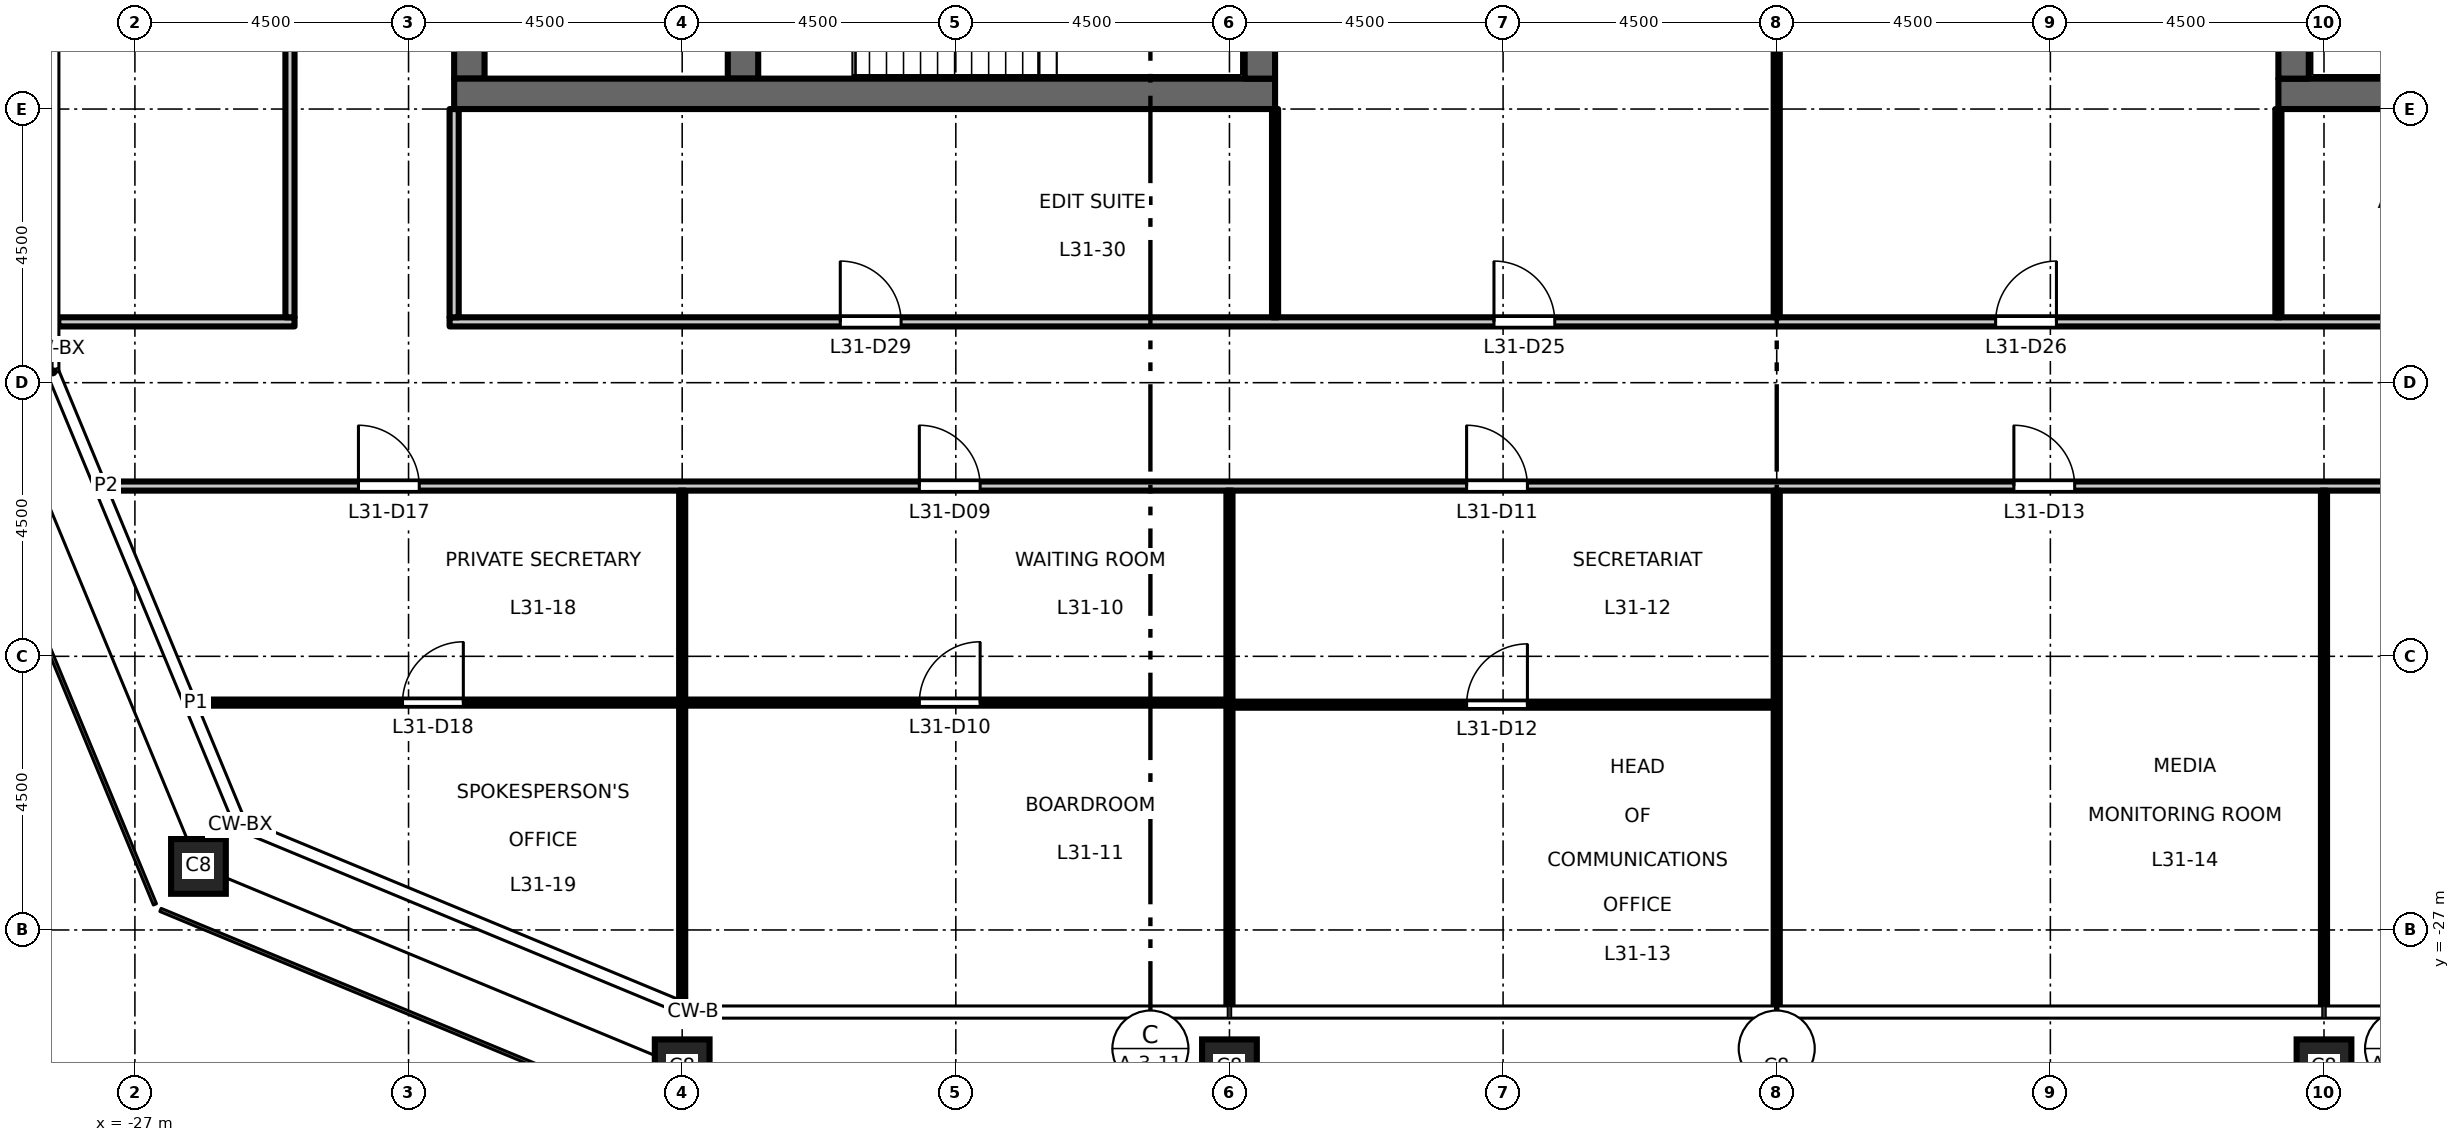
"""IFC4 building model, lengths in metres.
Left out: names, types, materials, properties, quantities, classifications, styles, units other than length and angle.
Written with IfcOpenShell. Run it as: python <this file> out.ifc"""

import sys

from ifc_helpers import new_model, si_unit, direction, frame, frame_2d, origin, origin_2d, place, context, subcontext, project, spatial, rectangle, hollow_rectangle, extrude, element, fill, save


model = new_model("IFC4")
c1 = context("Model", 3, precision=1e-05, world=origin(), true_north=direction((0.0, 1.0)))
c2 = subcontext(c1, "Body", "Model", "MODEL_VIEW")
j1 = project(units=[si_unit("LENGTHUNIT", "METRE"), si_unit("PLANEANGLEUNIT", "RADIAN")], contexts=[c1])
p1 = place(None, origin())
s1 = spatial("IfcSite", under=j1, at=p1, CompositionType="ELEMENT")
p2 = place(p1, origin())
s2 = spatial("IfcBuilding", under=s1, at=p2, CompositionType="ELEMENT")
p3 = place(p2, frame((0.0, 0.0, 145.2)))
s3 = spatial("IfcBuildingStorey", under=s2, at=p3, CompositionType="ELEMENT", Elevation=145.2)
for number, where, z_axis, x_axis in (
    (1, (-18.0, -29.25, 0.0), (0.0, 0.0, 1.0), (1.0, 0.0, 0.0)),
    (2, (-9.0, -29.25, 0.0), (0.0, 0.0, 1.0), (1.0, 0.0, 0.0)),
    (3, (0.0, -29.25, 0.0), (0.0, 0.0, 1.0), (1.0, 0.0, 0.0)),
    (4, (9.0, -29.25, 0.0), (0.0, 0.0, 1.0), (1.0, 0.0, 0.0)),
    (5, (-25.955, -25.955, 0.0), (0.0, 0.0, 1.0), (1.0, 0.0, 0.0)),
):
    element("IfcColumn", number, at=place(p3, frame(where, z_axis=z_axis, x_axis=x_axis)), inside=s3, PredefinedType="COLUMN", context=c2, shape_type="SweptSolid", body=[
        extrude(hollow_rectangle(XDim=0.9, YDim=0.9, WallThickness=0.05, at=origin_2d()), origin(), (0.0, 0.0, 1.0), 4.5),
    ])
p4 = place(p3, frame((-21.5, -13.0, 0.0), z_axis=(0.0, 0.0, 1.0), x_axis=(0.0, 1.0, 0.0)))
e6 = element("IfcWall", 6, at=p4, inside=s3, PredefinedType="SHEAR", context=c2, shape_type="SweptSolid", body=[
    extrude(rectangle(XDim=26.0, YDim=0.5, at=frame_2d((13.0, 0.0))), origin(), (0.0, 0.0, 1.0), 4.35),
])
p5 = place(p4, frame((16.825, 0.0, 0.0)))
e7 = element("IfcOpeningElement", 7, at=p5, cuts=e6, PredefinedType="OPENING", context=c2, shape_type="SweptSolid", body=[
    extrude(rectangle(XDim=1.8, YDim=2.1, at=frame_2d((0.9, 1.05))), frame((0.0, 0.26, 0.0), z_axis=(0.0, -1.0, 0.0), x_axis=(1.0, 0.0, 0.0)), (0.0, 0.0, 1.0), 0.52),
])
p6 = place(p4, frame((7.375, 0.0, 0.0)))
e8 = element("IfcOpeningElement", 8, at=p6, cuts=e6, PredefinedType="OPENING", context=c2, shape_type="SweptSolid", body=[
    extrude(rectangle(XDim=1.8, YDim=2.1, at=frame_2d((0.9, 1.05))), frame((0.0, 0.26, 0.0), z_axis=(0.0, -1.0, 0.0), x_axis=(1.0, 0.0, 0.0)), (0.0, 0.0, 1.0), 0.52),
])
p7 = place(p4, frame((23.4, 0.0, 0.0)))
e9 = element("IfcOpeningElement", 9, at=p7, cuts=e6, PredefinedType="OPENING", context=c2, shape_type="SweptSolid", body=[
    extrude(rectangle(XDim=0.9, YDim=2.1, at=frame_2d((0.45, 1.05))), frame((0.0, 0.26, 0.0), z_axis=(0.0, -1.0, 0.0), x_axis=(1.0, 0.0, 0.0)), (0.0, 0.0, 1.0), 0.52),
])
p8 = place(p3, frame((-17.0, -13.0, 0.0), z_axis=(0.0, 0.0, 1.0), x_axis=(0.0, 1.0, 0.0)))
e10 = element("IfcWall", 10, at=p8, inside=s3, PredefinedType="SHEAR", context=c2, shape_type="SweptSolid", body=[
    extrude(rectangle(XDim=6.575, YDim=0.5, at=frame_2d((3.288, 0.0))), origin(), (0.0, 0.0, 1.0), 4.35),
])
p9 = place(p3, frame((-8.25, -13.25, 0.0), z_axis=(0.0, 0.0, 1.0), x_axis=(-1.0, 0.0, 0.0)))
e11 = element("IfcWall", 11, at=p9, inside=s3, PredefinedType="SHEAR", context=c2, shape_type="SweptSolid", body=[
    extrude(rectangle(XDim=13.5, YDim=0.5, at=frame_2d((6.75, 0.0))), origin(), (0.0, 0.0, 1.0), 4.35),
])
p10 = place(p3, frame((-8.5, -13.0, 0.0), z_axis=(0.0, 0.0, 1.0), x_axis=(0.0, 1.0, 0.0)))
e12 = element("IfcWall", 12, at=p10, inside=s3, PredefinedType="SHEAR", context=c2, shape_type="SweptSolid", body=[
    extrude(rectangle(XDim=26.0, YDim=0.5, at=frame_2d((13.0, 0.0))), origin(), (0.0, 0.0, 1.0), 4.35),
])
p11 = place(p3, frame((8.25, -13.25, 0.0), z_axis=(0.0, 0.0, 1.0), x_axis=(1.0, 0.0, 0.0)))
e13 = element("IfcWall", 13, at=p11, inside=s3, PredefinedType="SHEAR", context=c2, shape_type="SweptSolid", body=[
    extrude(rectangle(XDim=13.5, YDim=0.5, at=frame_2d((6.75, 0.0))), origin(), (0.0, 0.0, 1.0), 4.35),
])
p12 = place(p3, frame((8.5, -13.0, 0.0), z_axis=(0.0, 0.0, 1.0), x_axis=(0.0, 1.0, 0.0)))
e14 = element("IfcWall", 14, at=p12, inside=s3, PredefinedType="SHEAR", context=c2, shape_type="SweptSolid", body=[
    extrude(rectangle(XDim=26.0, YDim=0.5, at=frame_2d((13.0, 0.0))), origin(), (0.0, 0.0, 1.0), 4.35),
])
p13 = place(p3, frame((-8.95, -23.295, 0.0), z_axis=(0.0, 0.0, 1.0), x_axis=(1.0, 0.0, 0.0)))
e15 = element("IfcWall", 15, at=p13, inside=s3, PredefinedType="PARTITIONING", context=c2, shape_type="SweptSolid", body=[
    extrude(rectangle(XDim=8.9, YDim=0.1, at=frame_2d((4.45, 0.0))), origin(), (0.0, 0.0, 1.0), 4.35),
])
p14 = place(p13, frame((3.85, 0.0, 0.0)))
e16 = element("IfcOpeningElement", 16, at=p14, cuts=e15, PredefinedType="OPENING", context=c2, shape_type="SweptSolid", body=[
    extrude(rectangle(XDim=1.0, YDim=2.1, at=frame_2d((0.5, 1.05))), frame((0.0, 0.06, 0.0), z_axis=(0.0, -1.0, 0.0), x_axis=(1.0, 0.0, 0.0)), (0.0, 0.0, 1.0), 0.12),
])
p15 = place(p3, frame((-25.999, -23.261, 0.0), z_axis=(0.0, 0.0, 1.0), x_axis=(1.0, 0.0, 0.0)))
e17 = element("IfcWall", 17, at=p15, inside=s3, PredefinedType="PARTITIONING", context=c2, shape_type="SweptSolid", body=[
    extrude(rectangle(XDim=16.949, YDim=0.1, at=frame_2d((8.475, 0.0))), origin(), (0.0, 0.0, 1.0), 4.35),
])
p16 = place(p15, frame((11.899, 0.0, 0.0)))
e18 = element("IfcOpeningElement", 18, at=p16, cuts=e17, PredefinedType="OPENING", context=c2, shape_type="SweptSolid", body=[
    extrude(rectangle(XDim=1.0, YDim=2.1, at=frame_2d((0.5, 1.05))), frame((0.0, 0.06, 0.0), z_axis=(0.0, -1.0, 0.0), x_axis=(1.0, 0.0, 0.0)), (0.0, 0.0, 1.0), 0.12),
])
p17 = place(p15, frame((3.4, 0.0, 0.0)))
e19 = element("IfcOpeningElement", 19, at=p17, cuts=e17, PredefinedType="OPENING", context=c2, shape_type="SweptSolid", body=[
    extrude(rectangle(XDim=1.0, YDim=2.1, at=frame_2d((0.5, 1.05))), frame((0.0, 0.06, 0.0), z_axis=(0.0, -1.0, 0.0), x_axis=(1.0, 0.0, 0.0)), (0.0, 0.0, 1.0), 0.12),
])
p18 = place(p3, frame((-27.474, -19.7, 0.0), z_axis=(0.0, 0.0, 1.0), x_axis=(1.0, 0.0, 0.0)))
e20 = element("IfcWall", 20, at=p18, inside=s3, PredefinedType="PARTITIONING", context=c2, shape_type="SweptSolid", body=[
    extrude(rectangle(XDim=54.948, YDim=0.15, at=frame_2d((27.474, 0.0))), origin(), (0.0, 0.0, 1.0), 4.35),
])
p19 = place(p18, frame((13.374, 0.0, 0.0)))
e21 = element("IfcOpeningElement", 21, at=p19, cuts=e20, PredefinedType="OPENING", context=c2, shape_type="SweptSolid", body=[
    extrude(rectangle(XDim=1.0, YDim=2.1, at=frame_2d((0.5, 1.05))), frame((0.0, 0.085, 0.0), z_axis=(0.0, -1.0, 0.0), x_axis=(1.0, 0.0, 0.0)), (0.0, 0.0, 1.0), 0.17),
])
p20 = place(p18, frame((22.374, 0.0, 0.0)))
e22 = element("IfcOpeningElement", 22, at=p20, cuts=e20, PredefinedType="OPENING", context=c2, shape_type="SweptSolid", body=[
    extrude(rectangle(XDim=1.0, YDim=2.1, at=frame_2d((0.5, 1.05))), frame((0.0, 0.085, 0.0), z_axis=(0.0, -1.0, 0.0), x_axis=(1.0, 0.0, 0.0)), (0.0, 0.0, 1.0), 0.17),
])
p21 = place(p18, frame((31.374, 0.0, 0.0)))
e23 = element("IfcOpeningElement", 23, at=p21, cuts=e20, PredefinedType="OPENING", context=c2, shape_type="SweptSolid", body=[
    extrude(rectangle(XDim=1.0, YDim=2.1, at=frame_2d((0.5, 1.05))), frame((0.0, 0.085, 0.0), z_axis=(0.0, -1.0, 0.0), x_axis=(1.0, 0.0, 0.0)), (0.0, 0.0, 1.0), 0.17),
])
p22 = place(p18, frame((40.374, 0.0, 0.0)))
e24 = element("IfcOpeningElement", 24, at=p22, cuts=e20, PredefinedType="OPENING", context=c2, shape_type="SweptSolid", body=[
    extrude(rectangle(XDim=1.0, YDim=2.1, at=frame_2d((0.5, 1.05))), frame((0.0, 0.085, 0.0), z_axis=(0.0, -1.0, 0.0), x_axis=(1.0, 0.0, 0.0)), (0.0, 0.0, 1.0), 0.17),
])
p23 = place(p18, frame((4.15, 0.0, 0.0)))
e25 = element("IfcOpeningElement", 25, at=p23, cuts=e20, PredefinedType="OPENING", context=c2, shape_type="SweptSolid", body=[
    extrude(rectangle(XDim=1.0, YDim=2.1, at=frame_2d((0.5, 1.05))), frame((0.0, 0.085, 0.0), z_axis=(0.0, -1.0, 0.0), x_axis=(1.0, 0.0, 0.0)), (0.0, 0.0, 1.0), 0.17),
])
p24 = place(p18, frame((49.624, 0.0, 0.0)))
e26 = element("IfcOpeningElement", 26, at=p24, cuts=e20, PredefinedType="OPENING", context=c2, shape_type="SweptSolid", body=[
    extrude(rectangle(XDim=1.0, YDim=2.1, at=frame_2d((0.5, 1.05))), frame((0.0, 0.085, 0.0), z_axis=(0.0, -1.0, 0.0), x_axis=(1.0, 0.0, 0.0)), (0.0, 0.0, 1.0), 0.17),
])
p25 = place(p3, frame((-28.26, -17.0, 0.0), z_axis=(0.0, 0.0, 1.0), x_axis=(1.0, 0.0, 0.0)))
e27 = element("IfcWall", 27, at=p25, inside=s3, PredefinedType="PARTITIONING", context=c2, shape_type="SweptSolid", body=[
    extrude(rectangle(XDim=3.885, YDim=0.15, at=frame_2d((1.942, 0.0))), origin(), (0.0, 0.0, 1.0), 4.35),
])
p26 = place(p3, frame((-21.825, -17.0, 0.0), z_axis=(0.0, 0.0, 1.0), x_axis=(1.0, 0.0, 0.0)))
e28 = element("IfcWall", 28, at=p26, inside=s3, PredefinedType="PARTITIONING", context=c2, shape_type="SweptSolid", body=[
    extrude(rectangle(XDim=43.65, YDim=0.15, at=frame_2d((21.825, 0.0))), origin(), (0.0, 0.0, 1.0), 4.35),
])
p27 = place(p26, frame((17.175, 0.0, 0.0)))
e29 = element("IfcOpeningElement", 29, at=p27, cuts=e28, PredefinedType="OPENING", context=c2, shape_type="SweptSolid", body=[
    extrude(rectangle(XDim=1.0, YDim=2.1, at=frame_2d((0.5, 1.05))), frame((0.0, 0.085, 0.0), z_axis=(0.0, -1.0, 0.0), x_axis=(1.0, 0.0, 0.0)), (0.0, 0.0, 1.0), 0.17),
])
p28 = place(p26, frame((25.425, 0.0, 0.0)))
e30 = element("IfcOpeningElement", 30, at=p28, cuts=e28, PredefinedType="OPENING", context=c2, shape_type="SweptSolid", body=[
    extrude(rectangle(XDim=1.0, YDim=2.1, at=frame_2d((0.5, 1.05))), frame((0.0, 0.085, 0.0), z_axis=(0.0, -1.0, 0.0), x_axis=(1.0, 0.0, 0.0)), (0.0, 0.0, 1.0), 0.17),
])
p29 = place(p26, frame((6.425, 0.0, 0.0)))
e31 = element("IfcOpeningElement", 31, at=p29, cuts=e28, PredefinedType="OPENING", context=c2, shape_type="SweptSolid", body=[
    extrude(rectangle(XDim=1.0, YDim=2.1, at=frame_2d((0.5, 1.05))), frame((0.0, 0.085, 0.0), z_axis=(0.0, -1.0, 0.0), x_axis=(1.0, 0.0, 0.0)), (0.0, 0.0, 1.0), 0.17),
])
p30 = place(p26, frame((36.425, 0.0, 0.0)))
e32 = element("IfcOpeningElement", 32, at=p30, cuts=e28, PredefinedType="OPENING", context=c2, shape_type="SweptSolid", body=[
    extrude(rectangle(XDim=1.0, YDim=2.1, at=frame_2d((0.5, 1.05))), frame((0.0, 0.085, 0.0), z_axis=(0.0, -1.0, 0.0), x_axis=(1.0, 0.0, 0.0)), (0.0, 0.0, 1.0), 0.17),
])
p31 = place(p3, frame((-24.45, -16.925, 0.0), z_axis=(0.0, 0.0, 1.0), x_axis=(0.0, 1.0, 0.0)))
e33 = element("IfcWall", 33, at=p31, inside=s3, PredefinedType="PARTITIONING", context=c2, shape_type="SweptSolid", body=[
    extrude(rectangle(XDim=33.85, YDim=0.15, at=frame_2d((16.925, 0.0))), origin(), (0.0, 0.0, 1.0), 4.35),
])
p32 = place(p31, frame((16.525, 0.0, 0.0)))
e34 = element("IfcOpeningElement", 34, at=p32, cuts=e33, PredefinedType="OPENING", context=c2, shape_type="SweptSolid", body=[
    extrude(rectangle(XDim=1.0, YDim=2.1, at=frame_2d((0.5, 1.05))), frame((0.0, 0.085, 0.0), z_axis=(0.0, -1.0, 0.0), x_axis=(1.0, 0.0, 0.0)), (0.0, 0.0, 1.0), 0.17),
])
p33 = place(p3, frame((-21.75, -16.925, 0.0), z_axis=(0.0, 0.0, 1.0), x_axis=(0.0, 1.0, 0.0)))
e35 = element("IfcWall", 35, at=p33, inside=s3, PredefinedType="PARTITIONING", context=c2, shape_type="SweptSolid", body=[
    extrude(rectangle(XDim=3.425, YDim=0.15, at=frame_2d((1.712, 0.0))), origin(), (0.0, 0.0, 1.0), 4.35),
])
p34 = place(p3, frame((-18.0, -28.178, 0.0), z_axis=(0.0, 0.0, 1.0), x_axis=(0.0, 1.0, 0.0)))
e36 = element("IfcWall", 36, at=p34, inside=s3, PredefinedType="PARTITIONING", context=c2, shape_type="SweptSolid", body=[
    extrude(rectangle(XDim=4.867, YDim=0.1, at=frame_2d((2.434, 0.0))), origin(), (0.0, 0.0, 1.0), 3.45),
])
p35 = place(p3, frame((-18.0, -23.211, 0.0), z_axis=(0.0, 0.0, 1.0), x_axis=(0.0, 1.0, 0.0)))
e37 = element("IfcWall", 37, at=p35, inside=s3, PredefinedType="PARTITIONING", context=c2, shape_type="SweptSolid", body=[
    extrude(rectangle(XDim=3.436, YDim=0.1, at=frame_2d((1.718, 0.0))), origin(), (0.0, 0.0, 1.0), 3.45),
])
p36 = place(p3, frame((-9.0, -28.26, 0.0), z_axis=(0.0, 0.0, 1.0), x_axis=(0.0, 1.0, 0.0)))
e38 = element("IfcWall", 38, at=p36, inside=s3, PredefinedType="PARTITIONING", context=c2, shape_type="SweptSolid", body=[
    extrude(rectangle(XDim=8.485, YDim=0.1, at=frame_2d((4.243, 0.0))), origin(), (0.0, 0.0, 1.0), 3.45),
])
p37 = place(p3, frame((-8.25, -16.925, 0.0), z_axis=(0.0, 0.0, 1.0), x_axis=(0.0, 1.0, 0.0)))
e39 = element("IfcWall", 39, at=p37, inside=s3, PredefinedType="PARTITIONING", context=c2, shape_type="SweptSolid", body=[
    extrude(rectangle(XDim=3.425, YDim=0.1, at=frame_2d((1.712, 0.0))), origin(), (0.0, 0.0, 1.0), 4.35),
])
p38 = place(p3, frame((0.0, -28.26, 0.0), z_axis=(0.0, 0.0, 1.0), x_axis=(0.0, 1.0, 0.0)))
e40 = element("IfcWall", 40, at=p38, inside=s3, PredefinedType="PARTITIONING", context=c2, shape_type="SweptSolid", body=[
    extrude(rectangle(XDim=8.485, YDim=0.1, at=frame_2d((4.243, 0.0))), origin(), (0.0, 0.0, 1.0), 3.45),
])
p39 = place(p3, frame((0.0, -16.925, 0.0), z_axis=(0.0, 0.0, 1.0), x_axis=(0.0, 1.0, 0.0)))
e41 = element("IfcWall", 41, at=p39, inside=s3, PredefinedType="PARTITIONING", context=c2, shape_type="SweptSolid", body=[
    extrude(rectangle(XDim=8.275, YDim=0.1, at=frame_2d((4.138, 0.0))), origin(), (0.0, 0.0, 1.0), 3.45),
])
p40 = place(p3, frame((8.25, -16.925, 0.0), z_axis=(0.0, 0.0, 1.0), x_axis=(0.0, 1.0, 0.0)))
e42 = element("IfcWall", 42, at=p40, inside=s3, PredefinedType="PARTITIONING", context=c2, shape_type="SweptSolid", body=[
    extrude(rectangle(XDim=3.425, YDim=0.1, at=frame_2d((1.712, 0.0))), origin(), (0.0, 0.0, 1.0), 4.35),
])
p41 = place(p3, frame((9.0, -28.26, 0.0), z_axis=(0.0, 0.0, 1.0), x_axis=(0.0, 1.0, 0.0)))
e43 = element("IfcWall", 43, at=p41, inside=s3, PredefinedType="PARTITIONING", context=c2, shape_type="SweptSolid", body=[
    extrude(rectangle(XDim=8.485, YDim=0.1, at=frame_2d((4.243, 0.0))), origin(), (0.0, 0.0, 1.0), 3.45),
])
p42 = place(p19, origin())
e44 = element("IfcDoor", 44, at=p42, inside=s3, OperationType="SINGLE_SWING_LEFT", PredefinedType="DOOR", context=c2, shape_type="SweptSolid", body=[
    extrude(rectangle(XDim=1.0, YDim=2.1, at=frame_2d((0.5, 1.05))), frame((0.0, 0.025, 0.0), z_axis=(0.0, -1.0, 0.0), x_axis=(1.0, 0.0, 0.0)), (0.0, 0.0, 1.0), 0.05),
])
fill(e21, e44)
p43 = place(p16, origin())
e45 = element("IfcDoor", 45, at=p43, inside=s3, OperationType="SINGLE_SWING_RIGHT", PredefinedType="DOOR", context=c2, shape_type="SweptSolid", body=[
    extrude(rectangle(XDim=1.0, YDim=2.1, at=frame_2d((0.5, 1.05))), frame((0.0, 0.025, 0.0), z_axis=(0.0, -1.0, 0.0), x_axis=(1.0, 0.0, 0.0)), (0.0, 0.0, 1.0), 0.05),
])
fill(e18, e45)
p44 = place(p20, origin())
e46 = element("IfcDoor", 46, at=p44, inside=s3, OperationType="SINGLE_SWING_LEFT", PredefinedType="DOOR", context=c2, shape_type="SweptSolid", body=[
    extrude(rectangle(XDim=1.0, YDim=2.1, at=frame_2d((0.5, 1.05))), frame((0.0, 0.025, 0.0), z_axis=(0.0, -1.0, 0.0), x_axis=(1.0, 0.0, 0.0)), (0.0, 0.0, 1.0), 0.05),
])
fill(e22, e46)
p45 = place(p14, origin())
e47 = element("IfcDoor", 47, at=p45, inside=s3, OperationType="SINGLE_SWING_RIGHT", PredefinedType="DOOR", context=c2, shape_type="SweptSolid", body=[
    extrude(rectangle(XDim=1.0, YDim=2.1, at=frame_2d((0.5, 1.05))), frame((0.0, 0.025, 0.0), z_axis=(0.0, -1.0, 0.0), x_axis=(1.0, 0.0, 0.0)), (0.0, 0.0, 1.0), 0.05),
])
fill(e16, e47)
p46 = place(p21, origin())
e48 = element("IfcDoor", 48, at=p46, inside=s3, OperationType="SINGLE_SWING_LEFT", PredefinedType="DOOR", context=c2, shape_type="SweptSolid", body=[
    extrude(rectangle(XDim=1.0, YDim=2.1, at=frame_2d((0.5, 1.05))), frame((0.0, 0.025, 0.0), z_axis=(0.0, -1.0, 0.0), x_axis=(1.0, 0.0, 0.0)), (0.0, 0.0, 1.0), 0.05),
])
fill(e23, e48)
p47 = place(p23, origin())
e49 = element("IfcDoor", 49, at=p47, inside=s3, OperationType="SINGLE_SWING_LEFT", PredefinedType="DOOR", context=c2, shape_type="SweptSolid", body=[
    extrude(rectangle(XDim=1.0, YDim=2.1, at=frame_2d((0.5, 1.05))), frame((0.0, 0.025, 0.0), z_axis=(0.0, -1.0, 0.0), x_axis=(1.0, 0.0, 0.0)), (0.0, 0.0, 1.0), 0.05),
])
fill(e25, e49)
p48 = place(p17, origin())
e50 = element("IfcDoor", 50, at=p48, inside=s3, OperationType="SINGLE_SWING_RIGHT", PredefinedType="DOOR", context=c2, shape_type="SweptSolid", body=[
    extrude(rectangle(XDim=1.0, YDim=2.1, at=frame_2d((0.5, 1.05))), frame((0.0, 0.025, 0.0), z_axis=(0.0, -1.0, 0.0), x_axis=(1.0, 0.0, 0.0)), (0.0, 0.0, 1.0), 0.05),
])
fill(e19, e50)
p49 = place(p27, origin())
e51 = element("IfcDoor", 51, at=p49, inside=s3, OperationType="SINGLE_SWING_LEFT", PredefinedType="DOOR", context=c2, shape_type="SweptSolid", body=[
    extrude(rectangle(XDim=1.0, YDim=2.1, at=frame_2d((0.5, 1.05))), frame((0.0, 0.025, 0.0), z_axis=(0.0, -1.0, 0.0), x_axis=(1.0, 0.0, 0.0)), (0.0, 0.0, 1.0), 0.05),
])
fill(e29, e51)
p50 = place(p28, origin())
e52 = element("IfcDoor", 52, at=p50, inside=s3, OperationType="SINGLE_SWING_RIGHT", PredefinedType="DOOR", context=c2, shape_type="SweptSolid", body=[
    extrude(rectangle(XDim=1.0, YDim=2.1, at=frame_2d((0.5, 1.05))), frame((0.0, 0.025, 0.0), z_axis=(0.0, -1.0, 0.0), x_axis=(1.0, 0.0, 0.0)), (0.0, 0.0, 1.0), 0.05),
])
fill(e30, e52)
p51 = place(p29, origin())
e53 = element("IfcDoor", 53, at=p51, inside=s3, OperationType="SINGLE_SWING_LEFT", PredefinedType="DOOR", context=c2, shape_type="SweptSolid", body=[
    extrude(rectangle(XDim=1.0, YDim=2.1, at=frame_2d((0.5, 1.05))), frame((0.0, 0.025, 0.0), z_axis=(0.0, -1.0, 0.0), x_axis=(1.0, 0.0, 0.0)), (0.0, 0.0, 1.0), 0.05),
])
fill(e31, e53)
save(model, sys.argv[1])
